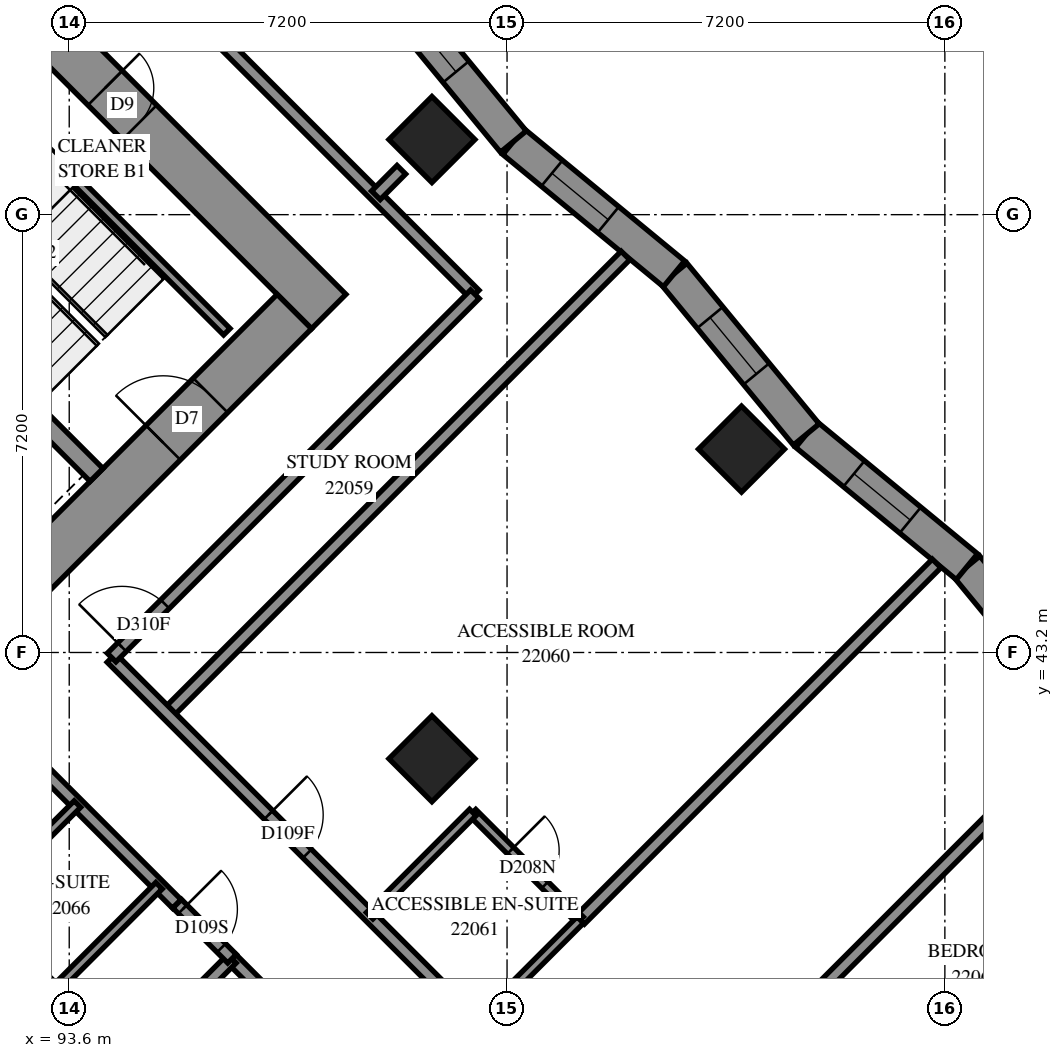
"""IFC4 building model, lengths in metres.
Left out: names, types, materials, properties, quantities, classifications, styles, units other than length and angle.
Written with IfcOpenShell. Run it as: python <this file> out.ifc"""

import sys

from ifc_helpers import new_model, si_unit, direction, frame, frame_2d, origin, origin_2d, place, context, subcontext, project, spatial, polyline, rectangle, outline, extrude, element, fill, save


model = new_model("IFC4")
c1 = context("Model", 3, precision=1e-05, world=origin(), true_north=direction((0.0, 1.0)))
c2 = subcontext(c1, "Body", "Model", "MODEL_VIEW")
j1 = project(units=[si_unit("LENGTHUNIT", "METRE"), si_unit("PLANEANGLEUNIT", "RADIAN")], contexts=[c1])
p1 = place(None, origin())
s1 = spatial("IfcSite", under=j1, at=p1, CompositionType="ELEMENT")
p2 = place(p1, origin())
s2 = spatial("IfcBuilding", under=s1, at=p2, CompositionType="ELEMENT")
p3 = place(p2, frame((0.0, 0.0, 84.6)))
s3 = spatial("IfcBuildingStorey", under=s2, at=p3, CompositionType="ELEMENT", Elevation=84.6)
for number, where, z_axis, x_axis in (
    (1, (99.565, 51.635, 0.0), (0.0, 0.0, 1.0), (0.707, -0.707, 0.0)),
    (2, (104.656, 46.544, 0.0), (0.0, 0.0, 1.0), (0.707, -0.707, 0.0)),
    (3, (99.565, 41.453, 0.0), (0.0, 0.0, 1.0), (0.707, -0.707, 0.0)),
):
    element("IfcColumn", number, at=place(p3, frame(where, z_axis=z_axis, x_axis=x_axis)), inside=s3, PredefinedType="COLUMN", context=c2, shape_type="SweptSolid", body=[
        extrude(rectangle(XDim=1.0, YDim=1.0, at=origin_2d()), origin(), (0.0, 0.0, 1.0), 3.1),
    ])
p4 = place(p3, frame((86.554, 60.121, -0.3), z_axis=(0.0, 0.0, 1.0), x_axis=(0.7071067812, -0.7071067812, 0.0)))
e4 = element("IfcWall", 4, at=p4, inside=s3, PredefinedType="SHEAR", context=c2, shape_type="SweptSolid", body=[
    extrude(rectangle(XDim=16.0, YDim=0.8, at=frame_2d((8.0, 0.0))), origin(), (0.0, 0.0, 1.0), 2.7),
])
p5 = place(p4, frame((10.8, 0.0, 0.3)))
e5 = element("IfcOpeningElement", 5, at=p5, cuts=e4, PredefinedType="OPENING", context=c2, shape_type="SweptSolid", body=[
    extrude(rectangle(XDim=0.8, YDim=2.1, at=frame_2d((0.4, 1.05))), frame((0.0, 0.41, 0.0), z_axis=(0.0, -1.0, 0.0), x_axis=(1.0, 0.0, 0.0)), (0.0, 0.0, 1.0), 0.82),
])
p6 = place(p3, frame((87.12, 38.625, -0.3), z_axis=(0.0, 0.0, 1.0), x_axis=(0.7071067812, 0.7071067812, 0.0)))
e6 = element("IfcWall", 6, at=p6, inside=s3, PredefinedType="SHEAR", context=c2, shape_type="SweptSolid", body=[
    extrude(rectangle(XDim=14.4, YDim=0.8, at=frame_2d((7.2, 0.0))), origin(), (0.0, 0.0, 1.0), 2.7),
])
p7 = place(p6, frame((4.55, 0.0, 0.3)))
e7 = element("IfcOpeningElement", 7, at=p7, cuts=e6, PredefinedType="OPENING", context=c2, shape_type="SweptSolid", body=[
    extrude(rectangle(XDim=1.1, YDim=2.1, at=frame_2d((0.55, 1.05))), frame((0.0, 0.41, 0.0), z_axis=(0.0, -1.0, 0.0), x_axis=(1.0, 0.0, 0.0)), (0.0, 0.0, 1.0), 0.82),
])
p8 = place(p6, frame((11.35, 0.0, 0.3)))
e8 = element("IfcOpeningElement", 8, at=p8, cuts=e6, PredefinedType="OPENING", context=c2, shape_type="SweptSolid", body=[
    extrude(rectangle(XDim=1.1, YDim=2.1, at=frame_2d((0.55, 1.05))), frame((0.0, 0.41, 0.0), z_axis=(0.0, -1.0, 0.0), x_axis=(1.0, 0.0, 0.0)), (0.0, 0.0, 1.0), 0.82),
])
p9 = place(p3, frame((88.958, 51.211, 0.0), z_axis=(0.0, 0.0, 1.0), x_axis=(0.7070998367, -0.7071137256, 0.0)))
e9 = element("IfcWall", 9, at=p9, inside=s3, PredefinedType="SOLIDWALL", context=c2, shape_type="SweptSolid", body=[
    extrude(rectangle(XDim=7.2, YDim=0.3, at=frame_2d((3.6, 0.0))), origin(), (0.0, 0.0, 1.0), 3.1),
])
p10 = place(p3, frame((110.553, 41.95, 0.0), z_axis=(0.0, 0.0, 1.0), x_axis=(-0.6356085732, 0.7720114906, 0.0)))
e10 = element("IfcWall", 10, at=p10, inside=s3, PredefinedType="SOLIDWALL", context=c2, shape_type="SweptSolid", body=[
    extrude(outline(polyline([(0.051, -0.275), (3.472, -0.275), (3.419, 0.275), (-0.051, 0.275), (0.051, -0.275)])), origin(), (0.0, 0.0, 1.0), 3.1),
])
p11 = place(p10, frame((1.109, 0.0, 0.5)))
e11 = element("IfcOpeningElement", 11, at=p11, cuts=e10, PredefinedType="OPENING", context=c2, shape_type="SweptSolid", body=[
    extrude(rectangle(XDim=1.2, YDim=2.45, at=frame_2d((0.6, 1.225))), frame((0.0, 0.285, 0.0), z_axis=(0.0, -1.0, 0.0), x_axis=(1.0, 0.0, 0.0)), (0.0, 0.0, 1.0), 0.57),
])
p12 = place(p3, frame((108.362, 44.611, 0.0), z_axis=(0.0, 0.0, 1.0), x_axis=(-0.7720044648, 0.6356171067, 0.0)))
e12 = element("IfcWall", 12, at=p12, inside=s3, PredefinedType="SOLIDWALL", context=c2, shape_type="SweptSolid", body=[
    extrude(outline(polyline([(-0.027, -0.275), (3.395, -0.275), (3.449, 0.275), (0.027, 0.275), (-0.027, -0.275)])), origin(), (0.0, 0.0, 1.0), 3.1),
])
p13 = place(p12, frame((1.206, 0.0, 0.5)))
e13 = element("IfcOpeningElement", 13, at=p13, cuts=e12, PredefinedType="OPENING", context=c2, shape_type="SweptSolid", body=[
    extrude(rectangle(XDim=1.2, YDim=2.45, at=frame_2d((0.6, 1.225))), frame((0.0, 0.285, 0.0), z_axis=(0.0, -1.0, 0.0), x_axis=(1.0, 0.0, 0.0)), (0.0, 0.0, 1.0), 0.57),
])
p14 = place(p3, frame((105.721, 46.785, 0.0), z_axis=(0.0, 0.0, 1.0), x_axis=(-0.6356171067, 0.7720044648, 0.0)))
e14 = element("IfcWall", 14, at=p14, inside=s3, PredefinedType="SOLIDWALL", context=c2, shape_type="SweptSolid", body=[
    extrude(outline(polyline([(0.027, -0.275), (3.449, -0.275), (3.395, 0.275), (-0.027, 0.275), (0.027, -0.275)])), origin(), (0.0, 0.0, 1.0), 3.1),
])
p15 = place(p14, frame((1.29, 0.0, 0.5)))
e15 = element("IfcOpeningElement", 15, at=p15, cuts=e14, PredefinedType="OPENING", context=c2, shape_type="SweptSolid", body=[
    extrude(rectangle(XDim=1.2, YDim=2.45, at=frame_2d((0.6, 1.225))), frame((0.0, 0.285, 0.0), z_axis=(0.0, -1.0, 0.0), x_axis=(1.0, 0.0, 0.0)), (0.0, 0.0, 1.0), 0.57),
])
p16 = place(p3, frame((103.546, 49.427, 0.0), z_axis=(0.0, 0.0, 1.0), x_axis=(-0.7720069983, 0.6356140296, 0.0)))
e16 = element("IfcWall", 16, at=p16, inside=s3, PredefinedType="SOLIDWALL", context=c2, shape_type="SweptSolid", body=[
    extrude(outline(polyline([(-0.027, -0.275), (3.395, -0.275), (3.449, 0.275), (0.027, 0.275), (-0.027, -0.275)])), origin(), (0.0, 0.0, 1.0), 3.1),
])
p17 = place(p16, frame((1.401, 0.0, 0.5)))
e17 = element("IfcOpeningElement", 17, at=p17, cuts=e16, PredefinedType="OPENING", context=c2, shape_type="SweptSolid", body=[
    extrude(rectangle(XDim=1.2, YDim=2.45, at=frame_2d((0.6, 1.225))), frame((0.0, 0.285, 0.0), z_axis=(0.0, -1.0, 0.0), x_axis=(1.0, 0.0, 0.0)), (0.0, 0.0, 1.0), 0.57),
])
p18 = place(p3, frame((100.904, 51.602, 0.0), z_axis=(0.0, 0.0, 1.0), x_axis=(-0.6356171067, 0.7720044648, 0.0)))
e18 = element("IfcWall", 18, at=p18, inside=s3, PredefinedType="SOLIDWALL", context=c2, shape_type="SweptSolid", body=[
    extrude(outline(polyline([(0.027, -0.275), (3.449, -0.275), (3.395, 0.275), (-0.027, 0.275), (0.027, -0.275)])), origin(), (0.0, 0.0, 1.0), 3.1),
])
p19 = place(p18, frame((1.485, 0.0, 0.5)))
e19 = element("IfcOpeningElement", 19, at=p19, cuts=e18, PredefinedType="OPENING", context=c2, shape_type="SweptSolid", body=[
    extrude(rectangle(XDim=1.2, YDim=2.45, at=frame_2d((0.6, 1.225))), frame((0.0, 0.285, 0.0), z_axis=(0.0, -1.0, 0.0), x_axis=(1.0, 0.0, 0.0)), (0.0, 0.0, 1.0), 0.57),
])
p20 = place(p3, frame((91.313, 53.354, 0.0), z_axis=(0.0, 0.0, 1.0), x_axis=(0.7071140275, -0.7070995348, 0.0)))
e20 = element("IfcWall", 20, at=p20, inside=s3, PredefinedType="PARTITIONING", context=c2, shape_type="SweptSolid", body=[
    extrude(rectangle(XDim=6.9, YDim=0.15, at=frame_2d((3.45, 0.0))), origin(), (0.0, 0.0, 1.0), 3.1),
])
p21 = place(p3, frame((87.894, 61.461, 0.0), z_axis=(0.0, 0.0, 1.0), x_axis=(0.7071067812, -0.7071067812, 0.0)))
e21 = element("IfcWall", 21, at=p21, inside=s3, PredefinedType="PARTITIONING", context=c2, shape_type="SweptSolid", body=[
    extrude(rectangle(XDim=17.5, YDim=0.2, at=frame_2d((8.75, 0.0))), origin(), (0.0, 0.0, 1.0), 3.1),
])
p22 = place(p21, frame((8.735, 0.0, 0.0)))
e22 = element("IfcOpeningElement", 22, at=p22, cuts=e21, PredefinedType="OPENING", context=c2, shape_type="SweptSolid", body=[
    extrude(rectangle(XDim=0.9, YDim=2.1, at=frame_2d((0.45, 1.05))), frame((0.0, 0.11, 0.0), z_axis=(0.0, -1.0, 0.0), x_axis=(1.0, 0.0, 0.0)), (0.0, 0.0, 1.0), 0.22),
])
p23 = place(p3, frame((95.215, 42.197, 0.0), z_axis=(0.0, 0.0, 1.0), x_axis=(0.7071114753, 0.7071020871, 0.0)))
e23 = element("IfcWall", 23, at=p23, inside=s3, PredefinedType="PARTITIONING", context=c2, shape_type="SweptSolid", body=[
    extrude(rectangle(XDim=10.652, YDim=0.2, at=frame_2d((5.326, 0.0))), origin(), (0.0, 0.0, 1.0), 3.1),
])
p24 = place(p3, frame((94.294, 43.111, 0.0), z_axis=(0.0, 0.0, 1.0), x_axis=(0.7071067812, -0.7071067812, 0.0)))
e24 = element("IfcWall", 24, at=p24, inside=s3, PredefinedType="PARTITIONING", context=c2, shape_type="SweptSolid", body=[
    extrude(rectangle(XDim=8.499, YDim=0.2, at=frame_2d((4.25, 0.0))), origin(), (0.0, 0.0, 1.0), 3.1),
])
p25 = place(p24, frame((3.651, 0.0, 0.0)))
e25 = element("IfcOpeningElement", 25, at=p25, cuts=e24, PredefinedType="OPENING", context=c2, shape_type="SweptSolid", body=[
    extrude(rectangle(XDim=0.9, YDim=2.1, at=frame_2d((0.45, 1.05))), frame((0.0, 0.11, 0.0), z_axis=(0.0, -1.0, 0.0), x_axis=(1.0, 0.0, 0.0)), (0.0, 0.0, 1.0), 0.22),
])
p26 = place(p3, frame((94.297, 43.117, 0.0), z_axis=(0.0, 0.0, 1.0), x_axis=(0.7071067812, 0.7071067812, 0.0)))
e26 = element("IfcWall", 26, at=p26, inside=s3, PredefinedType="PARTITIONING", context=c2, shape_type="SweptSolid", body=[
    extrude(rectangle(XDim=8.448, YDim=0.2, at=frame_2d((4.224, 0.0))), origin(), (0.0, 0.0, 1.0), 3.1),
])
p27 = place(p26, frame((0.242, 0.0, 0.0)))
e27 = element("IfcOpeningElement", 27, at=p27, cuts=e26, PredefinedType="OPENING", context=c2, shape_type="SweptSolid", body=[
    extrude(rectangle(XDim=1.0, YDim=2.1, at=frame_2d((0.5, 1.05))), frame((0.0, 0.11, 0.0), z_axis=(0.0, -1.0, 0.0), x_axis=(1.0, 0.0, 0.0)), (0.0, 0.0, 1.0), 0.22),
])
p28 = place(p3, frame((102.002, 38.804, 0.0), z_axis=(0.0, 0.0, 1.0), x_axis=(0.7072394704, 0.7069740671, 0.0)))
e28 = element("IfcWall", 28, at=p28, inside=s3, PredefinedType="PARTITIONING", context=c2, shape_type="SweptSolid", body=[
    extrude(rectangle(XDim=8.289, YDim=0.2, at=frame_2d((4.145, 0.0))), origin(), (0.0, 0.0, 1.0), 3.1),
])
p29 = place(p3, frame((105.155, 36.863, 0.0), z_axis=(0.0, 0.0, 1.0), x_axis=(0.7071067812, 0.7071067812, 0.0)))
e29 = element("IfcWall", 29, at=p29, inside=s3, PredefinedType="PARTITIONING", context=c2, shape_type="SweptSolid", body=[
    extrude(rectangle(XDim=5.787, YDim=0.2, at=frame_2d((2.893, 0.0))), origin(), (0.0, 0.0, 1.0), 3.1),
])
p30 = place(p3, frame((92.809, 41.627, 0.0), z_axis=(0.0, 0.0, 1.0), x_axis=(0.7071067812, -0.7071067812, 0.0)))
e30 = element("IfcWall", 30, at=p30, inside=s3, PredefinedType="PARTITIONING", context=c2, shape_type="SweptSolid", body=[
    extrude(rectangle(XDim=3.623, YDim=0.2, at=frame_2d((1.812, 0.0))), origin(), (0.0, 0.0, 1.0), 3.1),
])
p31 = place(p3, frame((96.274, 38.162, 0.0), z_axis=(0.0, 0.0, 1.0), x_axis=(0.7071067812, -0.7071067812, 0.0)))
e31 = element("IfcWall", 31, at=p31, inside=s3, PredefinedType="PARTITIONING", context=c2, shape_type="SweptSolid", body=[
    extrude(rectangle(XDim=3.1, YDim=0.2, at=frame_2d((1.55, 0.0))), origin(), (0.0, 0.0, 1.0), 3.1),
])
p32 = place(p3, frame((100.233, 40.567, 0.0), z_axis=(0.0, 0.0, 1.0), x_axis=(0.7071067812, -0.7071067812, 0.0)))
e32 = element("IfcWall", 32, at=p32, inside=s3, PredefinedType="PARTITIONING", context=c2, shape_type="SweptSolid", body=[
    extrude(rectangle(XDim=2.5, YDim=0.15, at=frame_2d((1.25, 0.0))), origin(), (0.0, 0.0, 1.0), 3.1),
])
p33 = place(p32, frame((0.883, 0.0, 0.0)))
e33 = element("IfcOpeningElement", 33, at=p33, cuts=e32, PredefinedType="OPENING", context=c2, shape_type="SweptSolid", body=[
    extrude(rectangle(XDim=0.8, YDim=2.1, at=frame_2d((0.4, 1.05))), frame((0.0, 0.085, 0.0), z_axis=(0.0, -1.0, 0.0), x_axis=(1.0, 0.0, 0.0)), (0.0, 0.0, 1.0), 0.17),
])
for number, where, z_axis, x_axis in (
    (34, (92.037, 39.011, 0.0), (0.0, 0.0, 1.0), (0.708, 0.707, 0.0)),
    (35, (93.381, 37.667, 0.0), (0.0, 0.0, 1.0), (0.707, 0.708, 0.0)),
    (36, (98.541, 38.871, 0.0), (0.0, 0.0, 1.0), (0.707, 0.708, 0.0)),
    (37, (100.308, 37.103, 0.0), (0.0, 0.0, 1.0), (0.707, 0.708, 0.0)),
):
    element("IfcWall", number, at=place(p3, frame(where, z_axis=z_axis, x_axis=x_axis)), inside=s3, PredefinedType="PARTITIONING", context=c2, shape_type="SweptSolid", body=[
        extrude(rectangle(XDim=2.4, YDim=0.15, at=frame_2d((1.2, 0.0))), origin(), (0.0, 0.0, 1.0), 3.1),
    ])
p34 = place(p3, frame((92.031, 39.011, 0.0), z_axis=(0.0, 0.0, 1.0), x_axis=(0.7071067812, -0.7071067812, 0.0)))
e38 = element("IfcWall", 38, at=p34, inside=s3, PredefinedType="PARTITIONING", context=c2, shape_type="SweptSolid", body=[
    extrude(rectangle(XDim=1.901, YDim=0.15, at=frame_2d((0.95, 0.0))), origin(), (0.0, 0.0, 1.0), 3.1),
])
p35 = place(p34, frame((0.502, 0.0, 0.0)))
e39 = element("IfcOpeningElement", 39, at=p35, cuts=e38, PredefinedType="OPENING", context=c2, shape_type="SweptSolid", body=[
    extrude(rectangle(XDim=0.8, YDim=2.1, at=frame_2d((0.4, 1.05))), frame((0.0, 0.085, 0.0), z_axis=(0.0, -1.0, 0.0), x_axis=(1.0, 0.0, 0.0)), (0.0, 0.0, 1.0), 0.17),
])
p36 = place(p3, frame((94.973, 36.863, 0.0), z_axis=(0.0, 0.0, 1.0), x_axis=(0.7071067812, 0.7071067812, 0.0)))
e40 = element("IfcWall", 40, at=p36, inside=s3, PredefinedType="PARTITIONING", context=c2, shape_type="SweptSolid", body=[
    extrude(rectangle(XDim=1.841, YDim=0.2, at=frame_2d((0.921, 0.0))), origin(), (0.0, 0.0, 1.0), 3.1),
])
p37 = place(p3, frame((95.375, 39.069, 0.0), z_axis=(0.0, 0.0, 1.0), x_axis=(0.7063232841, -0.7078894111, 0.0)))
e41 = element("IfcWall", 41, at=p37, inside=s3, PredefinedType="PARTITIONING", context=c2, shape_type="SweptSolid", body=[
    extrude(rectangle(XDim=1.277, YDim=0.2, at=frame_2d((0.638, 0.0))), origin(), (0.0, 0.0, 1.0), 3.1),
])
p38 = place(p37, frame((0.129, 0.0, 0.0)))
e42 = element("IfcOpeningElement", 42, at=p38, cuts=e41, PredefinedType="OPENING", context=c2, shape_type="SweptSolid", body=[
    extrude(rectangle(XDim=0.9, YDim=2.1, at=frame_2d((0.45, 1.05))), frame((0.0, 0.11, 0.0), z_axis=(0.0, -1.0, 0.0), x_axis=(1.0, 0.0, 0.0)), (0.0, 0.0, 1.0), 0.22),
])
p39 = place(p3, frame((98.644, 50.718, 0.0), z_axis=(0.0, 0.0, 1.0), x_axis=(0.7054171665, 0.7087923682, 0.0)))
e43 = element("IfcWall", 43, at=p39, inside=s3, PredefinedType="PARTITIONING", context=c2, shape_type="SweptSolid", body=[
    extrude(rectangle(XDim=0.593, YDim=0.2, at=frame_2d((0.296, 0.0))), origin(), (0.0, 0.0, 1.0), 3.1),
])
p40 = place(p13, origin())
e44 = element("IfcWindow", 44, at=p40, inside=s3, PartitioningType="SINGLE_PANEL", PredefinedType="WINDOW", context=c2, shape_type="SweptSolid", body=[
    extrude(rectangle(XDim=1.2, YDim=2.45, at=frame_2d((0.6, 1.225))), frame((0.0, 0.155, 0.0), z_axis=(0.0, -1.0, 0.0), x_axis=(1.0, 0.0, 0.0)), (0.0, 0.0, 1.0), 0.06),
])
fill(e13, e44)
p41 = place(p15, origin())
e45 = element("IfcWindow", 45, at=p41, inside=s3, PartitioningType="SINGLE_PANEL", PredefinedType="WINDOW", context=c2, shape_type="SweptSolid", body=[
    extrude(rectangle(XDim=1.2, YDim=2.45, at=frame_2d((0.6, 1.225))), frame((0.0, 0.155, 0.0), z_axis=(0.0, -1.0, 0.0), x_axis=(1.0, 0.0, 0.0)), (0.0, 0.0, 1.0), 0.06),
])
fill(e15, e45)
p42 = place(p17, origin())
e46 = element("IfcWindow", 46, at=p42, inside=s3, PartitioningType="SINGLE_PANEL", PredefinedType="WINDOW", context=c2, shape_type="SweptSolid", body=[
    extrude(rectangle(XDim=1.2, YDim=2.45, at=frame_2d((0.6, 1.225))), frame((0.0, 0.155, 0.0), z_axis=(0.0, -1.0, 0.0), x_axis=(1.0, 0.0, 0.0)), (0.0, 0.0, 1.0), 0.06),
])
fill(e17, e46)
p43 = place(p19, origin())
e47 = element("IfcWindow", 47, at=p43, inside=s3, PartitioningType="SINGLE_PANEL", PredefinedType="WINDOW", context=c2, shape_type="SweptSolid", body=[
    extrude(rectangle(XDim=1.2, YDim=2.45, at=frame_2d((0.6, 1.225))), frame((0.0, 0.155, 0.0), z_axis=(0.0, -1.0, 0.0), x_axis=(1.0, 0.0, 0.0)), (0.0, 0.0, 1.0), 0.06),
])
fill(e19, e47)
p44 = place(p5, origin())
e48 = element("IfcDoor", 48, at=p44, inside=s3, OperationType="SINGLE_SWING_RIGHT", PredefinedType="DOOR", context=c2, shape_type="SweptSolid", body=[
    extrude(rectangle(XDim=0.8, YDim=2.1, at=frame_2d((0.4, 1.05))), frame((0.0, -0.34, 0.0), z_axis=(0.0, -1.0, 0.0), x_axis=(1.0, 0.0, 0.0)), (0.0, 0.0, 1.0), 0.05),
])
fill(e5, e48)
p45 = place(p8, origin())
e49 = element("IfcDoor", 49, at=p45, inside=s3, OperationType="SINGLE_SWING_RIGHT", PredefinedType="DOOR", context=c2, shape_type="SweptSolid", body=[
    extrude(rectangle(XDim=1.1, YDim=2.1, at=frame_2d((0.55, 1.05))), frame((0.0, 0.025, 0.0), z_axis=(0.0, -1.0, 0.0), x_axis=(1.0, 0.0, 0.0)), (0.0, 0.0, 1.0), 0.05),
])
fill(e8, e49)
p46 = place(p27, origin())
e50 = element("IfcDoor", 50, at=p46, inside=s3, OperationType="SINGLE_SWING_LEFT", PredefinedType="DOOR", context=c2, shape_type="SweptSolid", body=[
    extrude(rectangle(XDim=1.0, YDim=2.1, at=frame_2d((0.5, 1.05))), frame((0.0, 0.025, 0.0), z_axis=(0.0, -1.0, 0.0), x_axis=(1.0, 0.0, 0.0)), (0.0, 0.0, 1.0), 0.05),
])
fill(e27, e50)
p47 = place(p25, origin())
e51 = element("IfcDoor", 51, at=p47, inside=s3, OperationType="SINGLE_SWING_RIGHT", PredefinedType="DOOR", context=c2, shape_type="SweptSolid", body=[
    extrude(rectangle(XDim=0.9, YDim=2.1, at=frame_2d((0.45, 1.05))), frame((0.0, 0.025, 0.0), z_axis=(0.0, -1.0, 0.0), x_axis=(1.0, 0.0, 0.0)), (0.0, 0.0, 1.0), 0.05),
])
fill(e25, e51)
p48 = place(p33, origin())
e52 = element("IfcDoor", 52, at=p48, inside=s3, OperationType="SINGLE_SWING_RIGHT", PredefinedType="DOOR", context=c2, shape_type="SweptSolid", body=[
    extrude(rectangle(XDim=0.8, YDim=2.1, at=frame_2d((0.4, 1.05))), frame((0.0, 0.025, 0.0), z_axis=(0.0, -1.0, 0.0), x_axis=(1.0, 0.0, 0.0)), (0.0, 0.0, 1.0), 0.05),
])
fill(e33, e52)
p49 = place(p38, origin())
e53 = element("IfcDoor", 53, at=p49, inside=s3, OperationType="SINGLE_SWING_LEFT", PredefinedType="DOOR", context=c2, shape_type="SweptSolid", body=[
    extrude(rectangle(XDim=0.9, YDim=2.1, at=frame_2d((0.45, 1.05))), frame((0.0, 0.025, 0.0), z_axis=(0.0, -1.0, 0.0), x_axis=(1.0, 0.0, 0.0)), (0.0, 0.0, 1.0), 0.05),
])
fill(e42, e53)
save(model, sys.argv[1])
